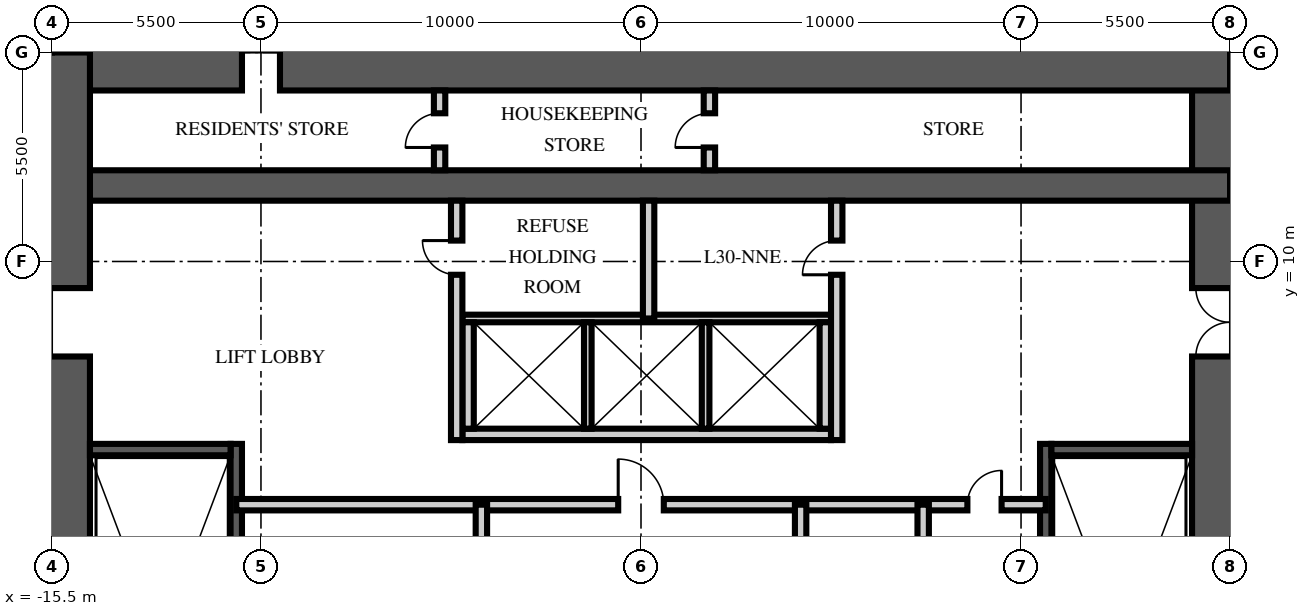
"""IFC4 building model, lengths in metres.
Left out: names, types, materials, properties, quantities, classifications, styles, units other than length and angle.
Written with IfcOpenShell. Run it as: python <this file> out.ifc"""

import sys

from ifc_helpers import new_model, si_unit, direction, frame, frame_2d, origin, place, context, subcontext, project, spatial, rectangle, extrude, element, fill, save


model = new_model("IFC4")
c1 = context("Model", 3, precision=1e-05, world=origin(), true_north=direction((0.0, 1.0)))
c2 = subcontext(c1, "Body", "Model", "MODEL_VIEW")
j1 = project(units=[si_unit("LENGTHUNIT", "METRE"), si_unit("PLANEANGLEUNIT", "RADIAN")], contexts=[c1])
p1 = place(None, origin())
s1 = spatial("IfcSite", under=j1, at=p1, CompositionType="ELEMENT")
p2 = place(p1, origin())
s2 = spatial("IfcBuilding", under=s1, at=p2, CompositionType="ELEMENT")
p3 = place(p2, frame((0.0, 0.0, 122.25)))
s3 = spatial("IfcBuildingStorey", under=s2, at=p3, CompositionType="ELEMENT", Elevation=122.25)
p4 = place(p3, frame((15.5, -15.5, -0.25), z_axis=(0.0, 0.0, 1.0), x_axis=(0.0, 1.0, 0.0)))
e1 = element("IfcWall", 1, at=p4, inside=s3, PredefinedType="SHEAR", context=c2, shape_type="SweptSolid", body=[
    extrude(rectangle(XDim=31.0, YDim=2.0, at=frame_2d((15.5, 0.0))), origin(), (0.0, 0.0, 1.0), 3.75),
])
p5 = place(p4, frame((6.5, 0.0, 0.25)))
e2 = element("IfcOpeningElement", 2, at=p5, cuts=e1, PredefinedType="OPENING", context=c2, shape_type="SweptSolid", body=[
    extrude(rectangle(XDim=1.2, YDim=2.1, at=frame_2d((0.6, 1.05))), frame((0.0, 1.01, 0.0), z_axis=(0.0, -1.0, 0.0), x_axis=(1.0, 0.0, 0.0)), (0.0, 0.0, 1.0), 2.02),
])
p6 = place(p4, frame((23.0, 0.0, 0.25)))
e3 = element("IfcOpeningElement", 3, at=p6, cuts=e1, PredefinedType="OPENING", context=c2, shape_type="SweptSolid", body=[
    extrude(rectangle(XDim=1.8, YDim=2.1, at=frame_2d((0.9, 1.05))), frame((0.0, 1.01, 0.0), z_axis=(0.0, -1.0, 0.0), x_axis=(1.0, 0.0, 0.0)), (0.0, 0.0, 1.0), 2.02),
])
p7 = place(p3, frame((-15.5, 15.5, -0.25), z_axis=(0.0, 0.0, 1.0), x_axis=(1.0, 0.0, 0.0)))
e4 = element("IfcWall", 4, at=p7, inside=s3, PredefinedType="SHEAR", context=c2, shape_type="SweptSolid", body=[
    extrude(rectangle(XDim=31.0, YDim=2.0, at=frame_2d((15.5, 0.0))), origin(), (0.0, 0.0, 1.0), 3.75),
])
p8 = place(p7, frame((5.0, 0.0, 0.25)))
e5 = element("IfcOpeningElement", 5, at=p8, cuts=e4, PredefinedType="OPENING", context=c2, shape_type="SweptSolid", body=[
    extrude(rectangle(XDim=1.0, YDim=2.1, at=frame_2d((0.5, 1.05))), frame((0.0, 1.01, 0.0), z_axis=(0.0, -1.0, 0.0), x_axis=(1.0, 0.0, 0.0)), (0.0, 0.0, 1.0), 2.02),
])
p9 = place(p3, frame((-15.5, 12.0, -0.25), z_axis=(0.0, 0.0, 1.0), x_axis=(1.0, 0.0, 0.0)))
e6 = element("IfcWall", 6, at=p9, inside=s3, PredefinedType="SHEAR", context=c2, shape_type="SweptSolid", body=[
    extrude(rectangle(XDim=31.0, YDim=0.8, at=frame_2d((15.5, 0.0))), origin(), (0.0, 0.0, 1.0), 3.75),
])
p10 = place(p3, frame((-15.5, -15.5, -0.25), z_axis=(0.0, 0.0, 1.0), x_axis=(0.0, 1.0, 0.0)))
e7 = element("IfcWall", 7, at=p10, inside=s3, PredefinedType="SHEAR", context=c2, shape_type="SweptSolid", body=[
    extrude(rectangle(XDim=31.0, YDim=2.0, at=frame_2d((15.5, 0.0))), origin(), (0.0, 0.0, 1.0), 3.75),
])
p11 = place(p10, frame((6.5, 0.0, 0.25)))
e8 = element("IfcOpeningElement", 8, at=p11, cuts=e7, PredefinedType="OPENING", context=c2, shape_type="SweptSolid", body=[
    extrude(rectangle(XDim=1.2, YDim=2.1, at=frame_2d((0.6, 1.05))), frame((0.0, 1.01, 0.0), z_axis=(0.0, -1.0, 0.0), x_axis=(1.0, 0.0, 0.0)), (0.0, 0.0, 1.0), 2.02),
])
p12 = place(p10, frame((23.0, 0.0, 0.25)))
e9 = element("IfcOpeningElement", 9, at=p12, cuts=e7, PredefinedType="OPENING", context=c2, shape_type="SweptSolid", body=[
    extrude(rectangle(XDim=1.8, YDim=2.1, at=frame_2d((0.9, 1.05))), frame((0.0, 1.01, 0.0), z_axis=(0.0, -1.0, 0.0), x_axis=(1.0, 0.0, 0.0)), (0.0, 0.0, 1.0), 2.02),
])
p13 = place(p3, frame((-10.65, -4.9, 0.0), z_axis=(0.0, 0.0, 1.0), x_axis=(0.0, 1.0, 0.0)))
e10 = element("IfcWall", 10, at=p13, inside=s3, PredefinedType="SOLIDWALL", context=c2, shape_type="SweptSolid", body=[
    extrude(rectangle(XDim=10.1, YDim=0.3, at=frame_2d((5.05, 0.0))), origin(), (0.0, 0.0, 1.0), 3.5),
])
p14 = place(p3, frame((-14.5, 5.05, 0.0), z_axis=(0.0, 0.0, 1.0), x_axis=(1.0, 0.0, 0.0)))
e11 = element("IfcWall", 11, at=p14, inside=s3, PredefinedType="SOLIDWALL", context=c2, shape_type="SweptSolid", body=[
    extrude(rectangle(XDim=3.7, YDim=0.3, at=frame_2d((1.85, 0.0))), origin(), (0.0, 0.0, 1.0), 3.5),
])
p15 = place(p3, frame((10.65, -4.9, 0.0), z_axis=(0.0, 0.0, 1.0), x_axis=(0.0, 1.0, 0.0)))
e12 = element("IfcWall", 12, at=p15, inside=s3, PredefinedType="SOLIDWALL", context=c2, shape_type="SweptSolid", body=[
    extrude(rectangle(XDim=10.1, YDim=0.3, at=frame_2d((5.05, 0.0))), origin(), (0.0, 0.0, 1.0), 3.5),
])
p16 = place(p3, frame((14.5, 5.05, 0.0), z_axis=(0.0, 0.0, 1.0), x_axis=(-1.0, 0.0, 0.0)))
e13 = element("IfcWall", 13, at=p16, inside=s3, PredefinedType="SOLIDWALL", context=c2, shape_type="SweptSolid", body=[
    extrude(rectangle(XDim=3.7, YDim=0.3, at=frame_2d((1.85, 0.0))), origin(), (0.0, 0.0, 1.0), 3.5),
])
p17 = place(p3, frame((-4.7, 5.45, 0.0), z_axis=(0.0, 0.0, 1.0), x_axis=(1.0, 0.0, 0.0)))
e14 = element("IfcWall", 14, at=p17, inside=s3, PredefinedType="PARTITIONING", context=c2, shape_type="SweptSolid", body=[
    extrude(rectangle(XDim=9.7, YDim=0.3, at=frame_2d((4.85, 0.0))), origin(), (0.0, 0.0, 1.0), 3.5),
])
p18 = place(p3, frame((-4.7, 8.5, 0.0), z_axis=(0.0, 0.0, 1.0), x_axis=(1.0, 0.0, 0.0)))
e15 = element("IfcWall", 15, at=p18, inside=s3, PredefinedType="PARTITIONING", context=c2, shape_type="SweptSolid", body=[
    extrude(rectangle(XDim=9.7, YDim=0.2, at=frame_2d((4.85, 0.0))), origin(), (0.0, 0.0, 1.0), 3.5),
])
for number, where, z_axis, x_axis in (
    (16, (-4.55, 5.6, 0.0), (0.0, 0.0, 1.0), (0.0, 1.0, 0.0)),
    (17, (4.85, 5.6, 0.0), (0.0, 0.0, 1.0), (0.0, 1.0, 0.0)),
):
    element("IfcWall", number, at=place(p3, frame(where, z_axis=z_axis, x_axis=x_axis)), inside=s3, PredefinedType="PARTITIONING", context=c2, shape_type="SweptSolid", body=[
        extrude(rectangle(XDim=2.8, YDim=0.3, at=frame_2d((1.4, 0.0))), origin(), (0.0, 0.0, 1.0), 3.5),
    ])
for number, where, z_axis, x_axis in (
    (18, (-1.4, 5.6, 0.0), (0.0, 0.0, 1.0), (0.0, 1.0, 0.0)),
    (19, (1.7, 5.6, 0.0), (0.0, 0.0, 1.0), (0.0, 1.0, 0.0)),
):
    element("IfcWall", number, at=place(p3, frame(where, z_axis=z_axis, x_axis=x_axis)), inside=s3, PredefinedType="PARTITIONING", context=c2, shape_type="SweptSolid", body=[
        extrude(rectangle(XDim=2.8, YDim=0.2, at=frame_2d((1.4, 0.0))), origin(), (0.0, 0.0, 1.0), 3.5),
    ])
p19 = place(p3, frame((-10.65, 3.6, 0.0), z_axis=(0.0, 0.0, 1.0), x_axis=(1.0, 0.0, 0.0)))
e20 = element("IfcWall", 20, at=p19, inside=s3, PredefinedType="PARTITIONING", context=c2, shape_type="SweptSolid", body=[
    extrude(rectangle(XDim=21.3, YDim=0.3, at=frame_2d((10.65, 0.0))), origin(), (0.0, 0.0, 1.0), 3.5),
])
p20 = place(p19, frame((10.05, 0.0, 0.0)))
e21 = element("IfcOpeningElement", 21, at=p20, cuts=e20, PredefinedType="OPENING", context=c2, shape_type="SweptSolid", body=[
    extrude(rectangle(XDim=1.2, YDim=2.1, at=frame_2d((0.6, 1.05))), frame((0.0, 0.16, 0.0), z_axis=(0.0, -1.0, 0.0), x_axis=(1.0, 0.0, 0.0)), (0.0, 0.0, 1.0), 0.32),
])
p21 = place(p19, frame((19.238, 0.0, 0.0)))
e22 = element("IfcOpeningElement", 22, at=p21, cuts=e20, PredefinedType="OPENING", context=c2, shape_type="SweptSolid", body=[
    extrude(rectangle(XDim=0.9, YDim=2.1, at=frame_2d((0.45, 1.05))), frame((0.0, 0.16, 0.0), z_axis=(0.0, -1.0, 0.0), x_axis=(1.0, 0.0, 0.0)), (0.0, 0.0, 1.0), 0.32),
])
p22 = place(p3, frame((-4.2, -6.65, 0.0), z_axis=(0.0, 0.0, 1.0), x_axis=(0.0, 1.0, 0.0)))
e23 = element("IfcWall", 23, at=p22, inside=s3, PredefinedType="PARTITIONING", context=c2, shape_type="SweptSolid", body=[
    extrude(rectangle(XDim=10.25, YDim=0.3, at=frame_2d((5.125, 0.0))), origin(), (0.0, 0.0, 1.0), 3.5),
])
p23 = place(p22, frame((0.787, 0.0, 0.0)))
e24 = element("IfcOpeningElement", 24, at=p23, cuts=e23, PredefinedType="OPENING", context=c2, shape_type="SweptSolid", body=[
    extrude(rectangle(XDim=0.9, YDim=2.1, at=frame_2d((0.45, 1.05))), frame((0.0, 0.16, 0.0), z_axis=(0.0, -1.0, 0.0), x_axis=(1.0, 0.0, 0.0)), (0.0, 0.0, 1.0), 0.32),
])
p24 = place(p22, frame((5.912, 0.0, 0.0)))
e25 = element("IfcOpeningElement", 25, at=p24, cuts=e23, PredefinedType="OPENING", context=c2, shape_type="SweptSolid", body=[
    extrude(rectangle(XDim=0.9, YDim=2.1, at=frame_2d((0.45, 1.05))), frame((0.0, 0.16, 0.0), z_axis=(0.0, -1.0, 0.0), x_axis=(1.0, 0.0, 0.0)), (0.0, 0.0, 1.0), 0.32),
])
p25 = place(p3, frame((4.2, -6.65, 0.0), z_axis=(0.0, 0.0, 1.0), x_axis=(0.0, 1.0, 0.0)))
e26 = element("IfcWall", 26, at=p25, inside=s3, PredefinedType="PARTITIONING", context=c2, shape_type="SweptSolid", body=[
    extrude(rectangle(XDim=10.25, YDim=0.3, at=frame_2d((5.125, 0.0))), origin(), (0.0, 0.0, 1.0), 3.5),
])
p26 = place(p25, frame((2.15, 0.0, 0.0)))
e27 = element("IfcOpeningElement", 27, at=p26, cuts=e26, PredefinedType="OPENING", context=c2, shape_type="SweptSolid", body=[
    extrude(rectangle(XDim=0.9, YDim=2.1, at=frame_2d((0.45, 1.05))), frame((0.0, 0.16, 0.0), z_axis=(0.0, -1.0, 0.0), x_axis=(1.0, 0.0, 0.0)), (0.0, 0.0, 1.0), 0.32),
])
p27 = place(p25, frame((7.275, 0.0, 0.0)))
e28 = element("IfcOpeningElement", 28, at=p27, cuts=e26, PredefinedType="OPENING", context=c2, shape_type="SweptSolid", body=[
    extrude(rectangle(XDim=0.9, YDim=2.1, at=frame_2d((0.45, 1.05))), frame((0.0, 0.16, 0.0), z_axis=(0.0, -1.0, 0.0), x_axis=(1.0, 0.0, 0.0)), (0.0, 0.0, 1.0), 0.32),
])
p28 = place(p3, frame((7.425, -1.45, 0.0), z_axis=(0.0, 0.0, 1.0), x_axis=(0.0, 1.0, 0.0)))
e29 = element("IfcWall", 29, at=p28, inside=s3, PredefinedType="PARTITIONING", context=c2, shape_type="SweptSolid", body=[
    extrude(rectangle(XDim=5.05, YDim=0.3, at=frame_2d((2.525, 0.0))), origin(), (0.0, 0.0, 1.0), 3.5),
])
p29 = place(p3, frame((-4.85, 5.3, 0.0), z_axis=(0.0, 0.0, 1.0), x_axis=(0.0, 1.0, 0.0)))
e30 = element("IfcWall", 30, at=p29, inside=s3, PredefinedType="PARTITIONING", context=c2, shape_type="SweptSolid", body=[
    extrude(rectangle(XDim=6.3, YDim=0.3, at=frame_2d((3.15, 0.0))), origin(), (0.0, 0.0, 1.0), 3.5),
])
p30 = place(p29, frame((4.35, 0.0, 0.0)))
e31 = element("IfcOpeningElement", 31, at=p30, cuts=e30, PredefinedType="OPENING", context=c2, shape_type="SweptSolid", body=[
    extrude(rectangle(XDim=0.9, YDim=2.1, at=frame_2d((0.45, 1.05))), frame((0.0, 0.16, 0.0), z_axis=(0.0, -1.0, 0.0), x_axis=(1.0, 0.0, 0.0)), (0.0, 0.0, 1.0), 0.32),
])
p31 = place(p3, frame((5.15, 5.3, 0.0), z_axis=(0.0, 0.0, 1.0), x_axis=(0.0, 1.0, 0.0)))
e32 = element("IfcWall", 32, at=p31, inside=s3, PredefinedType="PARTITIONING", context=c2, shape_type="SweptSolid", body=[
    extrude(rectangle(XDim=6.3, YDim=0.3, at=frame_2d((3.15, 0.0))), origin(), (0.0, 0.0, 1.0), 3.5),
])
p32 = place(p31, frame((4.35, 0.0, 0.0)))
e33 = element("IfcOpeningElement", 33, at=p32, cuts=e32, PredefinedType="OPENING", context=c2, shape_type="SweptSolid", body=[
    extrude(rectangle(XDim=0.9, YDim=2.1, at=frame_2d((0.45, 1.05))), frame((0.0, 0.16, 0.0), z_axis=(0.0, -1.0, 0.0), x_axis=(1.0, 0.0, 0.0)), (0.0, 0.0, 1.0), 0.32),
])
p33 = place(p3, frame((0.2, 8.5, 0.0), z_axis=(0.0, 0.0, 1.0), x_axis=(0.0, 1.0, 0.0)))
e34 = element("IfcWall", 34, at=p33, inside=s3, PredefinedType="PARTITIONING", context=c2, shape_type="SweptSolid", body=[
    extrude(rectangle(XDim=3.1, YDim=0.3, at=frame_2d((1.55, 0.0))), origin(), (0.0, 0.0, 1.0), 3.5),
])
p34 = place(p3, frame((-5.3, 12.4, 0.0), z_axis=(0.0, 0.0, 1.0), x_axis=(0.0, 1.0, 0.0)))
e35 = element("IfcWall", 35, at=p34, inside=s3, PredefinedType="PARTITIONING", context=c2, shape_type="SweptSolid", body=[
    extrude(rectangle(XDim=2.1, YDim=0.3, at=frame_2d((1.05, 0.0))), origin(), (0.0, 0.0, 1.0), 3.5),
])
p35 = place(p34, frame((0.6, 0.0, 0.0)))
e36 = element("IfcOpeningElement", 36, at=p35, cuts=e35, PredefinedType="OPENING", context=c2, shape_type="SweptSolid", body=[
    extrude(rectangle(XDim=0.9, YDim=2.1, at=frame_2d((0.45, 1.05))), frame((0.0, 0.16, 0.0), z_axis=(0.0, -1.0, 0.0), x_axis=(1.0, 0.0, 0.0)), (0.0, 0.0, 1.0), 0.32),
])
p36 = place(p3, frame((1.8, 12.4, 0.0), z_axis=(0.0, 0.0, 1.0), x_axis=(0.0, 1.0, 0.0)))
e37 = element("IfcWall", 37, at=p36, inside=s3, PredefinedType="PARTITIONING", context=c2, shape_type="SweptSolid", body=[
    extrude(rectangle(XDim=2.1, YDim=0.3, at=frame_2d((1.05, 0.0))), origin(), (0.0, 0.0, 1.0), 3.5),
])
p37 = place(p36, frame((0.6, 0.0, 0.0)))
e38 = element("IfcOpeningElement", 38, at=p37, cuts=e37, PredefinedType="OPENING", context=c2, shape_type="SweptSolid", body=[
    extrude(rectangle(XDim=0.9, YDim=2.1, at=frame_2d((0.45, 1.05))), frame((0.0, 0.16, 0.0), z_axis=(0.0, -1.0, 0.0), x_axis=(1.0, 0.0, 0.0)), (0.0, 0.0, 1.0), 0.32),
])
p38 = place(p12, origin())
e39 = element("IfcDoor", 39, at=p38, inside=s3, OperationType="DOUBLE_DOOR_SINGLE_SWING", PredefinedType="DOOR", context=c2, shape_type="SweptSolid", body=[
    extrude(rectangle(XDim=1.8, YDim=2.1, at=frame_2d((0.9, 1.05))), frame((0.0, 0.025, 0.0), z_axis=(0.0, -1.0, 0.0), x_axis=(1.0, 0.0, 0.0)), (0.0, 0.0, 1.0), 0.05),
])
fill(e9, e39)
p39 = place(p6, origin())
e40 = element("IfcDoor", 40, at=p39, inside=s3, OperationType="DOUBLE_DOOR_SINGLE_SWING", PredefinedType="DOOR", context=c2, shape_type="SweptSolid", body=[
    extrude(rectangle(XDim=1.8, YDim=2.1, at=frame_2d((0.9, 1.05))), frame((0.0, 0.025, 0.0), z_axis=(0.0, -1.0, 0.0), x_axis=(1.0, 0.0, 0.0)), (0.0, 0.0, 1.0), 0.05),
])
fill(e3, e40)
p40 = place(p20, origin())
e41 = element("IfcDoor", 41, at=p40, inside=s3, OperationType="SINGLE_SWING_LEFT", PredefinedType="DOOR", context=c2, shape_type="SweptSolid", body=[
    extrude(rectangle(XDim=1.2, YDim=2.1, at=frame_2d((0.6, 1.05))), frame((0.0, 0.025, 0.0), z_axis=(0.0, -1.0, 0.0), x_axis=(1.0, 0.0, 0.0)), (0.0, 0.0, 1.0), 0.05),
])
fill(e21, e41)
p41 = place(p21, origin())
e42 = element("IfcDoor", 42, at=p41, inside=s3, OperationType="SINGLE_SWING_RIGHT", PredefinedType="DOOR", context=c2, shape_type="SweptSolid", body=[
    extrude(rectangle(XDim=0.9, YDim=2.1, at=frame_2d((0.45, 1.05))), frame((0.0, 0.025, 0.0), z_axis=(0.0, -1.0, 0.0), x_axis=(1.0, 0.0, 0.0)), (0.0, 0.0, 1.0), 0.05),
])
fill(e22, e42)
p42 = place(p30, origin())
e43 = element("IfcDoor", 43, at=p42, inside=s3, OperationType="SINGLE_SWING_RIGHT", PredefinedType="DOOR", context=c2, shape_type="SweptSolid", body=[
    extrude(rectangle(XDim=0.9, YDim=2.1, at=frame_2d((0.45, 1.05))), frame((0.0, 0.025, 0.0), z_axis=(0.0, -1.0, 0.0), x_axis=(1.0, 0.0, 0.0)), (0.0, 0.0, 1.0), 0.05),
])
fill(e31, e43)
p43 = place(p32, origin())
e44 = element("IfcDoor", 44, at=p43, inside=s3, OperationType="SINGLE_SWING_LEFT", PredefinedType="DOOR", context=c2, shape_type="SweptSolid", body=[
    extrude(rectangle(XDim=0.9, YDim=2.1, at=frame_2d((0.45, 1.05))), frame((0.0, 0.025, 0.0), z_axis=(0.0, -1.0, 0.0), x_axis=(1.0, 0.0, 0.0)), (0.0, 0.0, 1.0), 0.05),
])
fill(e33, e44)
p44 = place(p35, origin())
e45 = element("IfcDoor", 45, at=p44, inside=s3, OperationType="SINGLE_SWING_LEFT", PredefinedType="DOOR", context=c2, shape_type="SweptSolid", body=[
    extrude(rectangle(XDim=0.9, YDim=2.1, at=frame_2d((0.45, 1.05))), frame((0.0, 0.025, 0.0), z_axis=(0.0, -1.0, 0.0), x_axis=(1.0, 0.0, 0.0)), (0.0, 0.0, 1.0), 0.05),
])
fill(e36, e45)
p45 = place(p37, origin())
e46 = element("IfcDoor", 46, at=p45, inside=s3, OperationType="SINGLE_SWING_LEFT", PredefinedType="DOOR", context=c2, shape_type="SweptSolid", body=[
    extrude(rectangle(XDim=0.9, YDim=2.1, at=frame_2d((0.45, 1.05))), frame((0.0, 0.025, 0.0), z_axis=(0.0, -1.0, 0.0), x_axis=(1.0, 0.0, 0.0)), (0.0, 0.0, 1.0), 0.05),
])
fill(e38, e46)
p46 = place(p8, origin())
e47 = element("IfcDoor", 47, at=p46, inside=s3, OperationType="SINGLE_SWING_RIGHT", PredefinedType="DOOR", context=c2, shape_type="SweptSolid", body=[
    extrude(rectangle(XDim=1.0, YDim=2.1, at=frame_2d((0.5, 1.05))), frame((0.0, 0.025, 0.0), z_axis=(0.0, -1.0, 0.0), x_axis=(1.0, 0.0, 0.0)), (0.0, 0.0, 1.0), 0.05),
])
fill(e5, e47)
save(model, sys.argv[1])
